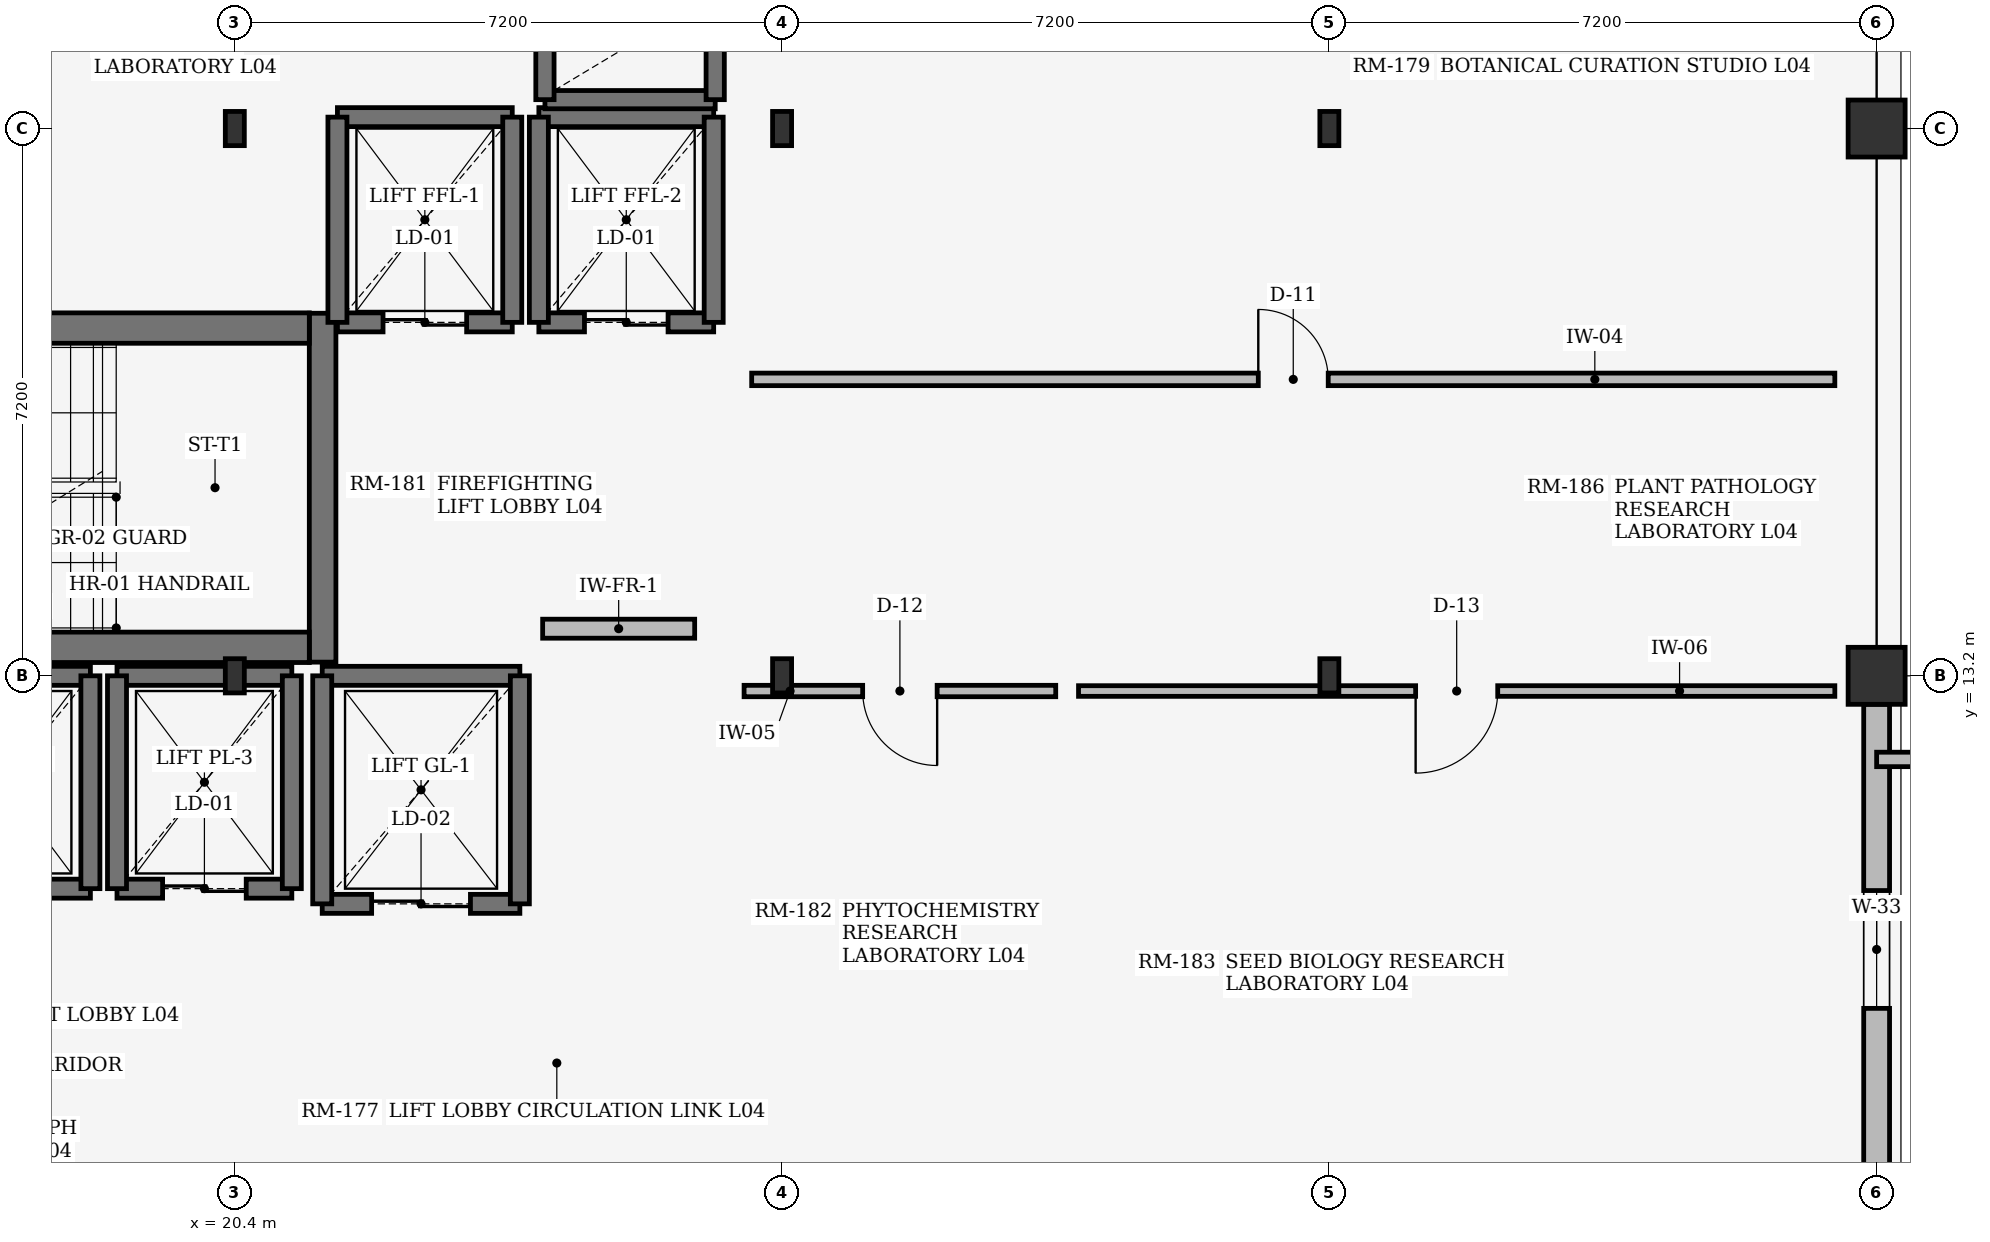
"""IFC4 building model, lengths in metres.
Left out: names, types, materials, properties, quantities, classifications, styles, units other than length and angle.
Written with IfcOpenShell. Run it as: python <this file> out.ifc"""

import sys

from ifc_helpers import new_model, si_unit, direction, frame, frame_2d, origin, origin_2d, place, context, subcontext, project, spatial, rectangle, i_section, extrude, element, fill, save


model = new_model("IFC4")
c1 = context("Model", 3, precision=1e-05, world=origin(), true_north=direction((0.0, 1.0)))
c2 = subcontext(c1, "Body", "Model", "MODEL_VIEW")
j1 = project(units=[si_unit("LENGTHUNIT", "METRE"), si_unit("PLANEANGLEUNIT", "RADIAN")], contexts=[c1])
p1 = place(None, origin())
s1 = spatial("IfcSite", under=j1, at=p1, CompositionType="ELEMENT")
p2 = place(p1, origin())
s2 = spatial("IfcBuilding", under=s1, at=p2, CompositionType="ELEMENT")
p3 = place(p2, frame((0.0, 0.0, 17.1)))
s3 = spatial("IfcBuildingStorey", under=s2, at=p3, CompositionType="ELEMENT", Elevation=17.1)
for number, where, z_axis, x_axis in (
    (1, (20.4, 13.2, 0.0), (0.0, 0.0, 1.0), (1.0, 0.0, 0.0)),
    (2, (20.4, 20.4, 0.0), (0.0, 0.0, 1.0), (1.0, 0.0, 0.0)),
    (3, (27.6, 13.2, 0.0), (0.0, 0.0, 1.0), (1.0, 0.0, 0.0)),
    (4, (27.6, 20.4, 0.0), (0.0, 0.0, 1.0), (1.0, 0.0, 0.0)),
    (5, (34.8, 13.2, 0.0), (0.0, 0.0, 1.0), (1.0, 0.0, 0.0)),
    (6, (34.8, 20.4, 0.0), (0.0, 0.0, 1.0), (1.0, 0.0, 0.0)),
):
    element("IfcColumn", number, at=place(p3, frame(where, z_axis=z_axis, x_axis=x_axis)), inside=s3, PredefinedType="COLUMN", context=c2, shape_type="SweptSolid", body=[
        extrude(i_section(OverallWidth=0.25, OverallDepth=0.45, WebThickness=0.011, FlangeThickness=0.014, at=origin_2d()), origin(), (0.0, 0.0, 1.0), 3.66),
    ])
for number, where, z_axis, x_axis in (
    (7, (42.0, 13.2, 0.0), (0.0, 0.0, 1.0), (1.0, 0.0, 0.0)),
    (8, (42.0, 20.4, 0.0), (0.0, 0.0, 1.0), (1.0, 0.0, 0.0)),
):
    element("IfcColumn", number, at=place(p3, frame(where, z_axis=z_axis, x_axis=x_axis)), inside=s3, PredefinedType="COLUMN", context=c2, shape_type="SweptSolid", body=[
        extrude(rectangle(XDim=0.75, YDim=0.75, at=origin_2d()), origin(), (0.0, 0.0, 1.0), 3.66),
    ])
p4 = place(p3, frame((42.0, 6.375, 0.0), z_axis=(0.0, 0.0, 1.0), x_axis=(0.0, 1.0, 0.0)))
e9 = element("IfcWall", 9, at=p4, inside=s3, PredefinedType="STANDARD", context=c2, shape_type="SweptSolid", body=[
    extrude(rectangle(XDim=6.45, YDim=0.34, at=frame_2d((3.225, 0.0))), origin(), (0.0, 0.0, 1.0), 3.04),
])
p5 = place(p4, frame((2.45, 0.0, 0.75)))
e10 = element("IfcOpeningElement", 10, at=p5, cuts=e9, PredefinedType="OPENING", context=c2, shape_type="SweptSolid", body=[
    extrude(rectangle(XDim=1.55, YDim=1.35, at=frame_2d((0.775, 0.675))), frame((0.0, 0.18, 0.0), z_axis=(0.0, -1.0, 0.0), x_axis=(1.0, 0.0, 0.0)), (0.0, 0.0, 1.0), 0.36),
])
p6 = place(p3, frame((42.0, 12.1, 0.0), z_axis=(0.0, 0.0, 1.0), x_axis=(1.0, 0.0, 0.0)))
e11 = element("IfcWall", 11, at=p6, inside=s3, PredefinedType="PARAPET", context=c2, shape_type="SweptSolid", body=[
    extrude(rectangle(XDim=46.1, YDim=0.19, at=frame_2d((23.05, 0.0))), origin(), (0.0, 0.0, 1.0), 1.2),
])
p7 = place(p3, frame((21.555, 13.38, 0.0), z_axis=(0.0, 0.0, 1.0), x_axis=(0.0, 1.0, 0.0)))
e12 = element("IfcWall", 12, at=p7, inside=s3, PredefinedType="SHEAR", context=c2, shape_type="SweptSolid", body=[
    extrude(rectangle(XDim=4.59, YDim=0.35, at=frame_2d((2.295, 0.0))), origin(), (0.0, 0.0, 1.0), 3.66),
])
for number, where, z_axis, x_axis in (
    (13, (13.4, 13.575, 0.0), (0.0, 0.0, 1.0), (1.0, 0.0, 0.0)),
    (14, (13.4, 17.775, 0.0), (0.0, 0.0, 1.0), (1.0, 0.0, 0.0)),
):
    element("IfcWall", number, at=place(p3, frame(where, z_axis=z_axis, x_axis=x_axis)), inside=s3, PredefinedType="SHEAR", context=c2, shape_type="SweptSolid", body=[
        extrude(rectangle(XDim=7.98, YDim=0.4, at=frame_2d((3.99, 0.0))), origin(), (0.0, 0.0, 1.0), 3.66),
    ])
p8 = place(p3, frame((21.75, 17.85, 0.0), z_axis=(0.0, 0.0, 1.0), x_axis=(1.0, 0.0, 0.0)))
e15 = element("IfcWall", 15, at=p8, inside=s3, PredefinedType="SHEAR", context=c2, shape_type="SweptSolid", body=[
    extrude(rectangle(XDim=2.3, YDim=0.25, at=frame_2d((1.15, 0.0))), origin(), (0.0, 0.0, 1.0), 3.66),
])
p9 = place(p8, frame((0.6, 0.0, 0.0)))
e16 = element("IfcOpeningElement", 16, at=p9, cuts=e15, PredefinedType="OPENING", context=c2, shape_type="SweptSolid", body=[
    extrude(rectangle(XDim=1.1, YDim=2.2, at=frame_2d((0.55, 1.1))), frame((0.0, 0.135, 0.0), z_axis=(0.0, -1.0, 0.0), x_axis=(1.0, 0.0, 0.0)), (0.0, 0.0, 1.0), 0.27),
])
p10 = place(p3, frame((21.75, 20.55, 0.0), z_axis=(0.0, 0.0, 1.0), x_axis=(1.0, 0.0, 0.0)))
e17 = element("IfcWall", 17, at=p10, inside=s3, PredefinedType="SHEAR", context=c2, shape_type="SweptSolid", body=[
    extrude(rectangle(XDim=2.3, YDim=0.25, at=frame_2d((1.15, 0.0))), origin(), (0.0, 0.0, 1.0), 3.66),
])
for number, where, z_axis, x_axis in (
    (18, (21.75, 17.85, 0.0), (0.0, 0.0, 1.0), (0.0, 1.0, 0.0)),
    (19, (24.05, 17.85, 0.0), (0.0, 0.0, 1.0), (0.0, 1.0, 0.0)),
):
    element("IfcWall", number, at=place(p3, frame(where, z_axis=z_axis, x_axis=x_axis)), inside=s3, PredefinedType="SHEAR", context=c2, shape_type="SweptSolid", body=[
        extrude(rectangle(XDim=2.7, YDim=0.25, at=frame_2d((1.35, 0.0))), origin(), (0.0, 0.0, 1.0), 3.66),
    ])
p11 = place(p3, frame((24.4, 17.85, 0.0), z_axis=(0.0, 0.0, 1.0), x_axis=(1.0, 0.0, 0.0)))
e20 = element("IfcWall", 20, at=p11, inside=s3, PredefinedType="SHEAR", context=c2, shape_type="SweptSolid", body=[
    extrude(rectangle(XDim=2.3, YDim=0.25, at=frame_2d((1.15, 0.0))), origin(), (0.0, 0.0, 1.0), 3.66),
])
p12 = place(p11, frame((0.6, 0.0, 0.0)))
e21 = element("IfcOpeningElement", 21, at=p12, cuts=e20, PredefinedType="OPENING", context=c2, shape_type="SweptSolid", body=[
    extrude(rectangle(XDim=1.1, YDim=2.2, at=frame_2d((0.55, 1.1))), frame((0.0, 0.135, 0.0), z_axis=(0.0, -1.0, 0.0), x_axis=(1.0, 0.0, 0.0)), (0.0, 0.0, 1.0), 0.27),
])
p13 = place(p3, frame((24.4, 20.55, 0.0), z_axis=(0.0, 0.0, 1.0), x_axis=(1.0, 0.0, 0.0)))
e22 = element("IfcWall", 22, at=p13, inside=s3, PredefinedType="SHEAR", context=c2, shape_type="SweptSolid", body=[
    extrude(rectangle(XDim=2.3, YDim=0.25, at=frame_2d((1.15, 0.0))), origin(), (0.0, 0.0, 1.0), 3.66),
])
for number, where, z_axis, x_axis in (
    (23, (24.4, 17.85, 0.0), (0.0, 0.0, 1.0), (0.0, 1.0, 0.0)),
    (24, (26.7, 17.85, 0.0), (0.0, 0.0, 1.0), (0.0, 1.0, 0.0)),
):
    element("IfcWall", number, at=place(p3, frame(where, z_axis=z_axis, x_axis=x_axis)), inside=s3, PredefinedType="SHEAR", context=c2, shape_type="SweptSolid", body=[
        extrude(rectangle(XDim=2.7, YDim=0.25, at=frame_2d((1.35, 0.0))), origin(), (0.0, 0.0, 1.0), 3.66),
    ])
p14 = place(p3, frame((16.2, 10.4, 0.0), z_axis=(0.0, 0.0, 1.0), x_axis=(1.0, 0.0, 0.0)))
e25 = element("IfcWall", 25, at=p14, inside=s3, PredefinedType="SHEAR", context=c2, shape_type="SweptSolid", body=[
    extrude(rectangle(XDim=2.3, YDim=0.25, at=frame_2d((1.15, 0.0))), origin(), (0.0, 0.0, 1.0), 3.66),
])
p15 = place(p14, frame((0.6, 0.0, 0.0)))
e26 = element("IfcOpeningElement", 26, at=p15, cuts=e25, PredefinedType="OPENING", context=c2, shape_type="SweptSolid", body=[
    extrude(rectangle(XDim=1.1, YDim=2.2, at=frame_2d((0.55, 1.1))), frame((0.0, 0.135, 0.0), z_axis=(0.0, -1.0, 0.0), x_axis=(1.0, 0.0, 0.0)), (0.0, 0.0, 1.0), 0.27),
])
p16 = place(p3, frame((16.2, 13.2, 0.0), z_axis=(0.0, 0.0, 1.0), x_axis=(1.0, 0.0, 0.0)))
e27 = element("IfcWall", 27, at=p16, inside=s3, PredefinedType="SHEAR", context=c2, shape_type="SweptSolid", body=[
    extrude(rectangle(XDim=2.3, YDim=0.25, at=frame_2d((1.15, 0.0))), origin(), (0.0, 0.0, 1.0), 3.66),
])
p17 = place(p3, frame((18.5, 10.4, 0.0), z_axis=(0.0, 0.0, 1.0), x_axis=(0.0, 1.0, 0.0)))
e28 = element("IfcWall", 28, at=p17, inside=s3, PredefinedType="SHEAR", context=c2, shape_type="SweptSolid", body=[
    extrude(rectangle(XDim=2.8, YDim=0.25, at=frame_2d((1.4, 0.0))), origin(), (0.0, 0.0, 1.0), 3.66),
])
p18 = place(p3, frame((18.85, 10.4, 0.0), z_axis=(0.0, 0.0, 1.0), x_axis=(1.0, 0.0, 0.0)))
e29 = element("IfcWall", 29, at=p18, inside=s3, PredefinedType="SHEAR", context=c2, shape_type="SweptSolid", body=[
    extrude(rectangle(XDim=2.3, YDim=0.25, at=frame_2d((1.15, 0.0))), origin(), (0.0, 0.0, 1.0), 3.66),
])
p19 = place(p18, frame((0.6, 0.0, 0.0)))
e30 = element("IfcOpeningElement", 30, at=p19, cuts=e29, PredefinedType="OPENING", context=c2, shape_type="SweptSolid", body=[
    extrude(rectangle(XDim=1.1, YDim=2.2, at=frame_2d((0.55, 1.1))), frame((0.0, 0.135, 0.0), z_axis=(0.0, -1.0, 0.0), x_axis=(1.0, 0.0, 0.0)), (0.0, 0.0, 1.0), 0.27),
])
p20 = place(p3, frame((18.85, 13.2, 0.0), z_axis=(0.0, 0.0, 1.0), x_axis=(1.0, 0.0, 0.0)))
e31 = element("IfcWall", 31, at=p20, inside=s3, PredefinedType="SHEAR", context=c2, shape_type="SweptSolid", body=[
    extrude(rectangle(XDim=2.3, YDim=0.25, at=frame_2d((1.15, 0.0))), origin(), (0.0, 0.0, 1.0), 3.66),
])
for number, where, z_axis, x_axis in (
    (32, (18.85, 10.4, 0.0), (0.0, 0.0, 1.0), (0.0, 1.0, 0.0)),
    (33, (21.15, 10.4, 0.0), (0.0, 0.0, 1.0), (0.0, 1.0, 0.0)),
):
    element("IfcWall", number, at=place(p3, frame(where, z_axis=z_axis, x_axis=x_axis)), inside=s3, PredefinedType="SHEAR", context=c2, shape_type="SweptSolid", body=[
        extrude(rectangle(XDim=2.8, YDim=0.25, at=frame_2d((1.4, 0.0))), origin(), (0.0, 0.0, 1.0), 3.66),
    ])
p21 = place(p3, frame((21.55, 10.2, 0.0), z_axis=(0.0, 0.0, 1.0), x_axis=(1.0, 0.0, 0.0)))
e34 = element("IfcWall", 34, at=p21, inside=s3, PredefinedType="SHEAR", context=c2, shape_type="SweptSolid", body=[
    extrude(rectangle(XDim=2.6, YDim=0.25, at=frame_2d((1.3, 0.0))), origin(), (0.0, 0.0, 1.0), 3.66),
])
p22 = place(p21, frame((0.65, 0.0, 0.0)))
e35 = element("IfcOpeningElement", 35, at=p22, cuts=e34, PredefinedType="OPENING", context=c2, shape_type="SweptSolid", body=[
    extrude(rectangle(XDim=1.3, YDim=2.25, at=frame_2d((0.65, 1.125))), frame((0.0, 0.135, 0.0), z_axis=(0.0, -1.0, 0.0), x_axis=(1.0, 0.0, 0.0)), (0.0, 0.0, 1.0), 0.27),
])
p23 = place(p3, frame((21.55, 13.2, 0.0), z_axis=(0.0, 0.0, 1.0), x_axis=(1.0, 0.0, 0.0)))
e36 = element("IfcWall", 36, at=p23, inside=s3, PredefinedType="SHEAR", context=c2, shape_type="SweptSolid", body=[
    extrude(rectangle(XDim=2.6, YDim=0.25, at=frame_2d((1.3, 0.0))), origin(), (0.0, 0.0, 1.0), 3.66),
])
for number, where, z_axis, x_axis in (
    (37, (21.55, 10.2, 0.0), (0.0, 0.0, 1.0), (0.0, 1.0, 0.0)),
    (38, (24.15, 10.2, 0.0), (0.0, 0.0, 1.0), (0.0, 1.0, 0.0)),
):
    element("IfcWall", number, at=place(p3, frame(where, z_axis=z_axis, x_axis=x_axis)), inside=s3, PredefinedType="SHEAR", context=c2, shape_type="SweptSolid", body=[
        extrude(rectangle(XDim=3.0, YDim=0.25, at=frame_2d((1.5, 0.0))), origin(), (0.0, 0.0, 1.0), 3.66),
    ])
p24 = place(p3, frame((24.48, 20.78, 0.0), z_axis=(0.0, 0.0, 1.0), x_axis=(1.0, 0.0, 0.0)))
e39 = element("IfcWall", 39, at=p24, inside=s3, PredefinedType="SHEAR", context=c2, shape_type="SweptSolid", body=[
    extrude(rectangle(XDim=2.24, YDim=0.24, at=frame_2d((1.12, 0.0))), origin(), (0.0, 0.0, 1.0), 3.66),
])
for number, where, z_axis, x_axis in (
    (40, (24.48, 20.78, 0.0), (0.0, 0.0, 1.0), (0.0, 1.0, 0.0)),
    (41, (26.72, 20.78, 0.0), (0.0, 0.0, 1.0), (0.0, 1.0, 0.0)),
):
    element("IfcWall", number, at=place(p3, frame(where, z_axis=z_axis, x_axis=x_axis)), inside=s3, PredefinedType="SHEAR", context=c2, shape_type="SweptSolid", body=[
        extrude(rectangle(XDim=2.94, YDim=0.24, at=frame_2d((1.47, 0.0))), origin(), (0.0, 0.0, 1.0), 3.66),
    ])
p25 = place(p3, frame((24.45, 13.82, 0.0), z_axis=(0.0, 0.0, 1.0), x_axis=(1.0, 0.0, 0.0)))
e42 = element("IfcWall", 42, at=p25, inside=s3, PredefinedType="SOLIDWALL", context=c2, shape_type="SweptSolid", body=[
    extrude(rectangle(XDim=2.0, YDim=0.25, at=frame_2d((1.0, 0.0))), origin(), (0.0, 0.0, 1.0), 3.64),
])
p26 = place(p3, frame((27.2, 17.1, 0.0), z_axis=(0.0, 0.0, 1.0), x_axis=(1.0, 0.0, 0.0)))
e43 = element("IfcWall", 43, at=p26, inside=s3, PredefinedType="PARTITIONING", context=c2, shape_type="SweptSolid", body=[
    extrude(rectangle(XDim=14.25, YDim=0.165, at=frame_2d((7.125, 0.0))), origin(), (0.0, 0.0, 1.0), 3.64),
])
p27 = place(p26, frame((6.665, 0.0, 0.0)))
e44 = element("IfcOpeningElement", 44, at=p27, cuts=e43, PredefinedType="OPENING", context=c2, shape_type="SweptSolid", body=[
    extrude(rectangle(XDim=0.92, YDim=2.1, at=frame_2d((0.46, 1.05))), frame((0.0, 0.093, 0.0), z_axis=(0.0, -1.0, 0.0), x_axis=(1.0, 0.0, 0.0)), (0.0, 0.0, 1.0), 0.185),
])
p28 = place(p3, frame((27.1, 13.0, 0.0), z_axis=(0.0, 0.0, 1.0), x_axis=(1.0, 0.0, 0.0)))
e45 = element("IfcWall", 45, at=p28, inside=s3, PredefinedType="PARTITIONING", context=c2, shape_type="SweptSolid", body=[
    extrude(rectangle(XDim=4.1, YDim=0.15, at=frame_2d((2.05, 0.0))), origin(), (0.0, 0.0, 1.0), 3.64),
])
p29 = place(p28, frame((1.56, 0.0, 0.0)))
e46 = element("IfcOpeningElement", 46, at=p29, cuts=e45, PredefinedType="OPENING", context=c2, shape_type="SweptSolid", body=[
    extrude(rectangle(XDim=0.98, YDim=2.1, at=frame_2d((0.49, 1.05))), frame((0.0, 0.085, 0.0), z_axis=(0.0, -1.0, 0.0), x_axis=(1.0, 0.0, 0.0)), (0.0, 0.0, 1.0), 0.17),
])
p30 = place(p3, frame((31.5, 13.0, 0.0), z_axis=(0.0, 0.0, 1.0), x_axis=(1.0, 0.0, 0.0)))
e47 = element("IfcWall", 47, at=p30, inside=s3, PredefinedType="PARTITIONING", context=c2, shape_type="SweptSolid", body=[
    extrude(rectangle(XDim=9.95, YDim=0.14, at=frame_2d((4.975, 0.0))), origin(), (0.0, 0.0, 1.0), 3.64),
])
p31 = place(p30, frame((4.435, 0.0, 0.0)))
e48 = element("IfcOpeningElement", 48, at=p31, cuts=e47, PredefinedType="OPENING", context=c2, shape_type="SweptSolid", body=[
    extrude(rectangle(XDim=1.08, YDim=2.1, at=frame_2d((0.54, 1.05))), frame((0.0, 0.08, 0.0), z_axis=(0.0, -1.0, 0.0), x_axis=(1.0, 0.0, 0.0)), (0.0, 0.0, 1.0), 0.16),
])
p32 = place(p5, origin())
e49 = element("IfcWindow", 49, at=p32, inside=s3, PartitioningType="SINGLE_PANEL", PredefinedType="WINDOW", context=c2, shape_type="SweptSolid", body=[
    extrude(rectangle(XDim=1.55, YDim=1.35, at=frame_2d((0.775, 0.675))), frame((0.0, 0.03, 0.0), z_axis=(0.0, -1.0, 0.0), x_axis=(1.0, 0.0, 0.0)), (0.0, 0.0, 1.0), 0.06),
])
fill(e10, e49)
p33 = place(p9, origin())
e50 = element("IfcDoor", 50, at=p33, inside=s3, OperationType="DOUBLE_DOOR_SLIDING", PredefinedType="DOOR", context=c2, shape_type="SweptSolid", body=[
    extrude(rectangle(XDim=1.1, YDim=2.2, at=frame_2d((0.55, 1.1))), frame((0.0, 0.025, 0.0), z_axis=(0.0, -1.0, 0.0), x_axis=(1.0, 0.0, 0.0)), (0.0, 0.0, 1.0), 0.05),
])
fill(e16, e50)
p34 = place(p12, origin())
e51 = element("IfcDoor", 51, at=p34, inside=s3, OperationType="DOUBLE_DOOR_SLIDING", PredefinedType="DOOR", context=c2, shape_type="SweptSolid", body=[
    extrude(rectangle(XDim=1.1, YDim=2.2, at=frame_2d((0.55, 1.1))), frame((0.0, 0.025, 0.0), z_axis=(0.0, -1.0, 0.0), x_axis=(1.0, 0.0, 0.0)), (0.0, 0.0, 1.0), 0.05),
])
fill(e21, e51)
p35 = place(p19, origin())
e52 = element("IfcDoor", 52, at=p35, inside=s3, OperationType="DOUBLE_DOOR_SLIDING", PredefinedType="DOOR", context=c2, shape_type="SweptSolid", body=[
    extrude(rectangle(XDim=1.1, YDim=2.2, at=frame_2d((0.55, 1.1))), frame((0.0, 0.025, 0.0), z_axis=(0.0, -1.0, 0.0), x_axis=(1.0, 0.0, 0.0)), (0.0, 0.0, 1.0), 0.05),
])
fill(e30, e52)
p36 = place(p22, origin())
e53 = element("IfcDoor", 53, at=p36, inside=s3, OperationType="DOUBLE_DOOR_SLIDING", PredefinedType="DOOR", context=c2, shape_type="SweptSolid", body=[
    extrude(rectangle(XDim=1.3, YDim=2.25, at=frame_2d((0.65, 1.125))), frame((0.0, 0.025, 0.0), z_axis=(0.0, -1.0, 0.0), x_axis=(1.0, 0.0, 0.0)), (0.0, 0.0, 1.0), 0.05),
])
fill(e35, e53)
p37 = place(p27, origin())
e54 = element("IfcDoor", 54, at=p37, inside=s3, OperationType="SINGLE_SWING_LEFT", PredefinedType="DOOR", context=c2, shape_type="SweptSolid", body=[
    extrude(rectangle(XDim=0.92, YDim=2.1, at=frame_2d((0.46, 1.05))), frame((0.0, 0.025, 0.0), z_axis=(0.0, -1.0, 0.0), x_axis=(1.0, 0.0, 0.0)), (0.0, 0.0, 1.0), 0.05),
])
fill(e44, e54)
p38 = place(p29, origin())
e55 = element("IfcDoor", 55, at=p38, inside=s3, OperationType="SINGLE_SWING_RIGHT", PredefinedType="DOOR", context=c2, shape_type="SweptSolid", body=[
    extrude(rectangle(XDim=0.98, YDim=2.1, at=frame_2d((0.49, 1.05))), frame((0.0, 0.025, 0.0), z_axis=(0.0, -1.0, 0.0), x_axis=(1.0, 0.0, 0.0)), (0.0, 0.0, 1.0), 0.05),
])
fill(e46, e55)
p39 = place(p31, frame((1.08, 0.0, 0.0), z_axis=(0.0, 0.0, 1.0), x_axis=(-1.0, 0.0, 0.0)))
e56 = element("IfcDoor", 56, at=p39, inside=s3, OperationType="SINGLE_SWING_LEFT", PredefinedType="DOOR", context=c2, shape_type="SweptSolid", body=[
    extrude(rectangle(XDim=1.08, YDim=2.1, at=frame_2d((0.54, 1.05))), frame((0.0, 0.025, 0.0), z_axis=(0.0, -1.0, 0.0), x_axis=(1.0, 0.0, 0.0)), (0.0, 0.0, 1.0), 0.05),
])
fill(e48, e56)
save(model, sys.argv[1])
